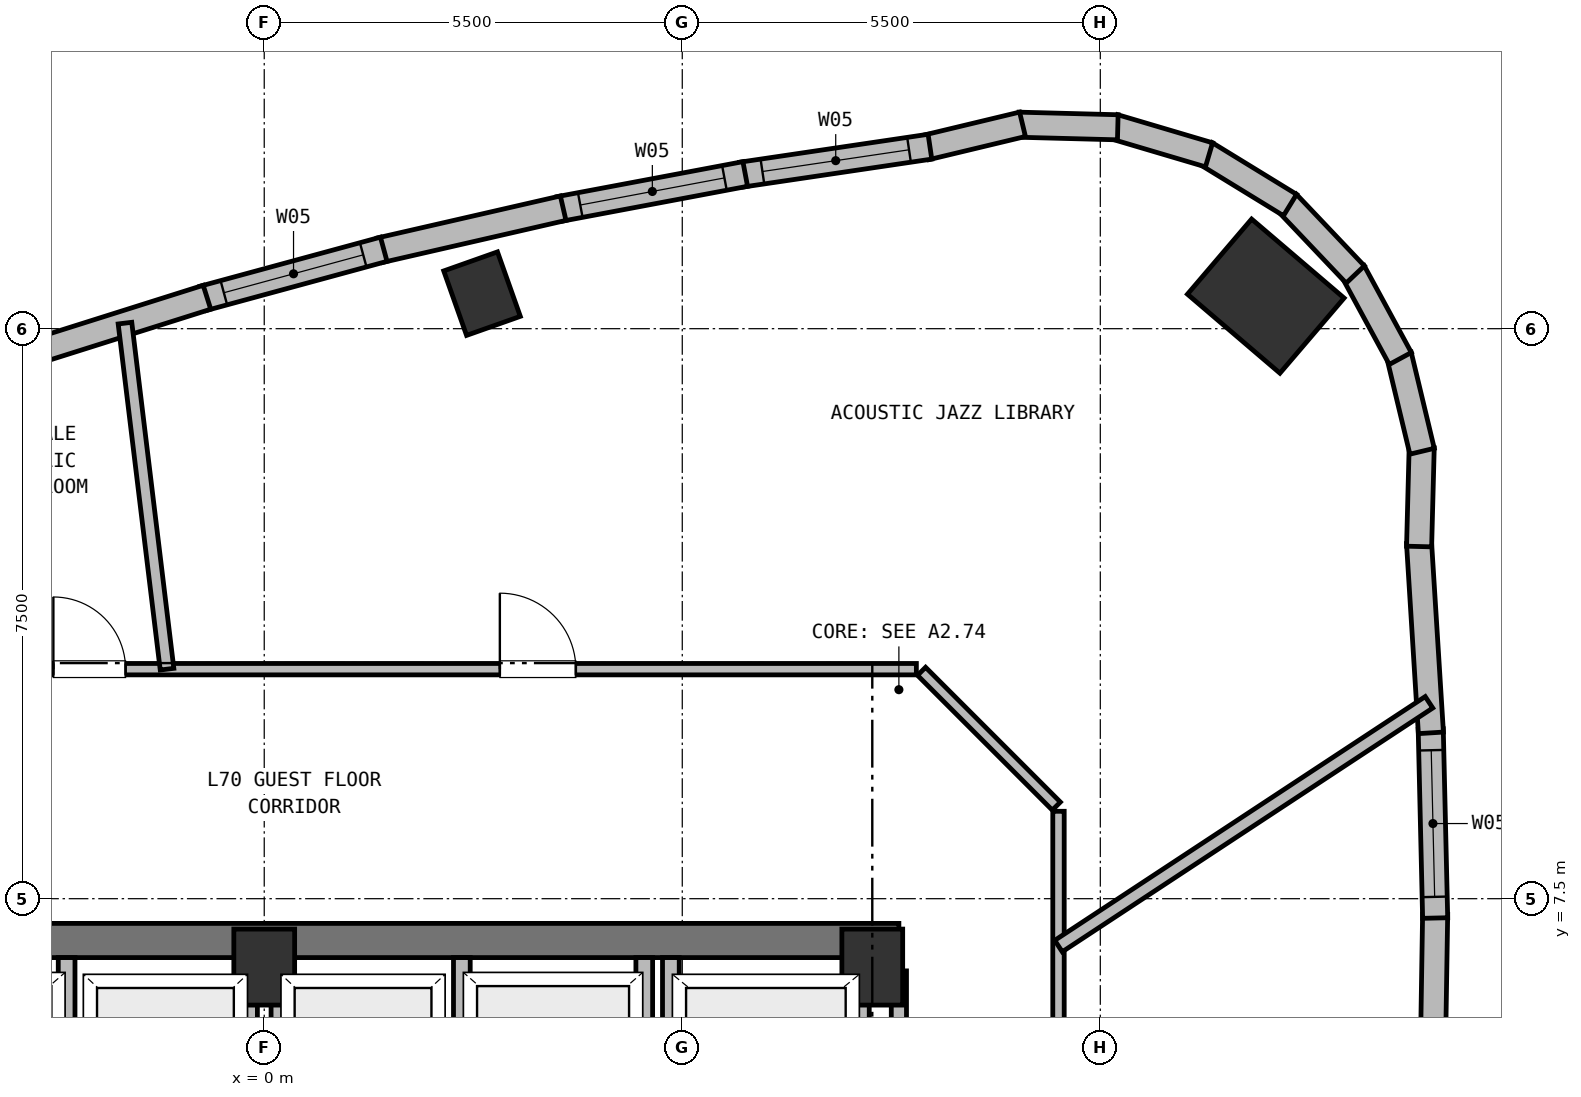
"""IFC4 building model, lengths in metres.
Left out: names, types, materials, properties, quantities, classifications, styles, units other than length and angle.
Written with IfcOpenShell. Run it as: python <this file> out.ifc"""

import sys

from ifc_helpers import new_model, si_unit, direction, frame, frame_2d, origin, origin_2d, place, context, subcontext, project, spatial, rectangle, extrude, element, fill, save


model = new_model("IFC4")
c1 = context("Model", 3, precision=1e-05, world=origin(), true_north=direction((0.0, 1.0)))
c2 = subcontext(c1, "Body", "Model", "MODEL_VIEW")
j1 = project(units=[si_unit("LENGTHUNIT", "METRE"), si_unit("PLANEANGLEUNIT", "RADIAN")], contexts=[c1])
p1 = place(None, origin())
s1 = spatial("IfcSite", under=j1, at=p1, CompositionType="ELEMENT")
p2 = place(p1, origin())
s2 = spatial("IfcBuilding", under=s1, at=p2, CompositionType="ELEMENT")
p3 = place(p2, frame((0.0, 0.0, 281.6)))
s3 = spatial("IfcBuildingStorey", under=s2, at=p3, CompositionType="ELEMENT", Elevation=281.6)
for number, where, z_axis, x_axis in (
    (1, (8.0, 6.6, 0.0), (0.0, 0.0, 1.0), (1.0, 0.0, 0.0)),
    (2, (0.0, 6.6, 0.0), (0.0, 0.0, 1.0), (1.0, 0.0, 0.0)),
):
    element("IfcColumn", number, at=place(p3, frame(where, z_axis=z_axis, x_axis=x_axis)), inside=s3, PredefinedType="COLUMN", context=c2, shape_type="SweptSolid", body=[
        extrude(rectangle(XDim=0.8, YDim=1.0, at=origin_2d()), origin(), (0.0, 0.0, 1.0), 4.4),
    ])
p4 = place(p3, frame((-8.35, 6.95, 0.0), z_axis=(0.0, 0.0, 1.0), x_axis=(1.0, 0.0, 0.0)))
e3 = element("IfcWall", 3, at=p4, inside=s3, PredefinedType="SHEAR", context=c2, shape_type="SweptSolid", body=[
    extrude(rectangle(XDim=16.7, YDim=0.45, at=frame_2d((8.35, 0.0))), origin(), (0.0, 0.0, 1.0), 4.13),
])
p5 = place(p3, frame((13.177, 15.428, 0.0), z_axis=(0.0, 0.0, 1.0), x_axis=(0.64944804833, 0.7604059656, 0.0)))
e4 = element("IfcColumn", 4, at=p5, inside=s3, PredefinedType="COLUMN", context=c2, shape_type="SweptSolid", body=[
    extrude(rectangle(XDim=1.3, YDim=1.6, at=origin_2d()), origin(), (0.0, 0.0, 1.0), 4.4),
])
p6 = place(p3, frame((2.865, 15.461, 0.0), z_axis=(0.0, 0.0, 1.0), x_axis=(0.942641491092, 0.333806859234, 0.0)))
e5 = element("IfcColumn", 5, at=p6, inside=s3, PredefinedType="COLUMN", context=c2, shape_type="SweptSolid", body=[
    extrude(rectangle(XDim=0.75, YDim=0.9, at=origin_2d()), origin(), (0.0, 0.0, 1.0), 4.4),
])
p7 = place(p3, frame((15.406, 7.295, 0.0), z_axis=(0.0, 0.0, 1.0), x_axis=(-0.016099859072, -0.999870388869, 0.0)))
e6 = element("IfcWall", 6, at=p7, inside=s3, PredefinedType="SOLIDWALL", context=c2, shape_type="SweptSolid", body=[
    extrude(rectangle(XDim=2.472, YDim=0.33, at=frame_2d((1.236, 0.0))), origin(), (0.0, 0.0, 1.0), 4.13),
])
p8 = place(p3, frame((15.347, 9.732, 0.0), z_axis=(0.0, 0.0, 1.0), x_axis=(0.023459423149, -0.999724789862, 0.0)))
e7 = element("IfcWall", 7, at=p8, inside=s3, PredefinedType="SOLIDWALL", context=c2, shape_type="SweptSolid", body=[
    extrude(rectangle(XDim=2.487, YDim=0.33, at=frame_2d((1.244, 0.0))), origin(), (0.0, 0.0, 1.0), 4.13),
])
p9 = place(p8, frame((0.279, 0.0, 0.72)))
e8 = element("IfcOpeningElement", 8, at=p9, cuts=e7, PredefinedType="OPENING", context=c2, shape_type="SweptSolid", body=[
    extrude(rectangle(XDim=1.93, YDim=2.15, at=frame_2d((0.965, 1.075))), frame((0.0, 0.175, 0.0), z_axis=(0.0, -1.0, 0.0), x_axis=(1.0, 0.0, 0.0)), (0.0, 0.0, 1.0), 0.35),
])
p10 = place(p3, frame((15.193, 12.184, 0.0), z_axis=(0.0, 0.0, 1.0), x_axis=(0.062329780416, -0.998055608908, 0.0)))
e9 = element("IfcWall", 9, at=p10, inside=s3, PredefinedType="SOLIDWALL", context=c2, shape_type="SweptSolid", body=[
    extrude(rectangle(XDim=2.507, YDim=0.33, at=frame_2d((1.253, 0.0))), origin(), (0.0, 0.0, 1.0), 4.13),
])
p11 = place(p3, frame((15.229, 13.437, 0.0), z_axis=(0.0, 0.0, 1.0), x_axis=(-0.026227855826, -0.999655990618, 0.0)))
e10 = element("IfcWall", 10, at=p11, inside=s3, PredefinedType="SOLIDWALL", context=c2, shape_type="SweptSolid", body=[
    extrude(rectangle(XDim=1.303, YDim=0.33, at=frame_2d((0.652, 0.0))), origin(), (0.0, 0.0, 1.0), 4.13),
])
p12 = place(p3, frame((14.929, 14.654, 0.0), z_axis=(0.0, 0.0, 1.0), x_axis=(0.233443812137, -0.972370292931, 0.0)))
e11 = element("IfcWall", 11, at=p12, inside=s3, PredefinedType="SOLIDWALL", context=c2, shape_type="SweptSolid", body=[
    extrude(rectangle(XDim=1.303, YDim=0.33, at=frame_2d((0.651, 0.0))), origin(), (0.0, 0.0, 1.0), 4.13),
])
for number, where, z_axis, x_axis in (
    (12, (14.325, 15.753, 0.0), (0.0, 0.0, 1.0), (0.477, -0.879, 0.0)),
    (13, (13.458, 16.658, 0.0), (0.0, 0.0, 1.0), (0.688, -0.725, 0.0)),
    (14, (12.385, 17.308, 0.0), (0.0, 0.0, 1.0), (0.853, -0.523, 0.0)),
    (15, (11.181, 17.658, 0.0), (0.0, 0.0, 1.0), (0.959, -0.284, 0.0)),
    (16, (9.927, 17.684, 0.0), (0.0, 0.0, 1.0), (1.0, -0.026, 0.0)),
):
    element("IfcWall", number, at=place(p3, frame(where, z_axis=z_axis, x_axis=x_axis)), inside=s3, PredefinedType="SOLIDWALL", context=c2, shape_type="SweptSolid", body=[
        extrude(rectangle(XDim=1.303, YDim=0.33, at=frame_2d((0.652, 0.0))), origin(), (0.0, 0.0, 1.0), 4.13),
    ])
p13 = place(p3, frame((8.71, 17.385, 0.0), z_axis=(0.0, 0.0, 1.0), x_axis=(0.972360080062, 0.233486347997, 0.0)))
e17 = element("IfcWall", 17, at=p13, inside=s3, PredefinedType="SOLIDWALL", context=c2, shape_type="SweptSolid", body=[
    extrude(rectangle(XDim=1.303, YDim=0.33, at=frame_2d((0.651, 0.0))), origin(), (0.0, 0.0, 1.0), 4.13),
])
p14 = place(p3, frame((6.279, 17.027, 0.0), z_axis=(0.0, 0.0, 1.0), x_axis=(0.989195615859, 0.146601615152, 0.0)))
e18 = element("IfcWall", 18, at=p14, inside=s3, PredefinedType="SOLIDWALL", context=c2, shape_type="SweptSolid", body=[
    extrude(rectangle(XDim=2.506, YDim=0.33, at=frame_2d((1.253, 0.0))), origin(), (0.0, 0.0, 1.0), 4.13),
])
p15 = place(p14, frame((0.278, 0.0, 0.72)))
e19 = element("IfcOpeningElement", 19, at=p15, cuts=e18, PredefinedType="OPENING", context=c2, shape_type="SweptSolid", body=[
    extrude(rectangle(XDim=1.95, YDim=2.15, at=frame_2d((0.975, 1.075))), frame((0.0, 0.175, 0.0), z_axis=(0.0, -1.0, 0.0), x_axis=(1.0, 0.0, 0.0)), (0.0, 0.0, 1.0), 0.35),
])
p16 = place(p3, frame((3.884, 16.575, 0.0), z_axis=(0.0, 0.0, 1.0), x_axis=(0.982755323562, 0.184910719024, 0.0)))
e20 = element("IfcWall", 20, at=p16, inside=s3, PredefinedType="SOLIDWALL", context=c2, shape_type="SweptSolid", body=[
    extrude(rectangle(XDim=2.488, YDim=0.33, at=frame_2d((1.244, 0.0))), origin(), (0.0, 0.0, 1.0), 4.13),
])
p17 = place(p16, frame((0.279, 0.0, 0.72)))
e21 = element("IfcOpeningElement", 21, at=p17, cuts=e20, PredefinedType="OPENING", context=c2, shape_type="SweptSolid", body=[
    extrude(rectangle(XDim=1.93, YDim=2.15, at=frame_2d((0.965, 1.075))), frame((0.0, 0.175, 0.0), z_axis=(0.0, -1.0, 0.0), x_axis=(1.0, 0.0, 0.0)), (0.0, 0.0, 1.0), 0.35),
])
p18 = place(p3, frame((1.524, 16.033, 0.0), z_axis=(0.0, 0.0, 1.0), x_axis=(0.974681670362, 0.223597051545, 0.0)))
e22 = element("IfcWall", 22, at=p18, inside=s3, PredefinedType="SOLIDWALL", context=c2, shape_type="SweptSolid", body=[
    extrude(rectangle(XDim=2.472, YDim=0.33, at=frame_2d((1.236, 0.0))), origin(), (0.0, 0.0, 1.0), 4.13),
])
p19 = place(p3, frame((-0.802, 15.399, 0.0), z_axis=(0.0, 0.0, 1.0), x_axis=(0.964933096461, 0.262495941596, 0.0)))
e23 = element("IfcWall", 23, at=p19, inside=s3, PredefinedType="SOLIDWALL", context=c2, shape_type="SweptSolid", body=[
    extrude(rectangle(XDim=2.46, YDim=0.33, at=frame_2d((1.23, 0.0))), origin(), (0.0, 0.0, 1.0), 4.13),
])
p20 = place(p19, frame((0.28, 0.0, 0.72)))
e24 = element("IfcOpeningElement", 24, at=p20, cuts=e23, PredefinedType="OPENING", context=c2, shape_type="SweptSolid", body=[
    extrude(rectangle(XDim=1.9, YDim=2.15, at=frame_2d((0.95, 1.075))), frame((0.0, 0.175, 0.0), z_axis=(0.0, -1.0, 0.0), x_axis=(1.0, 0.0, 0.0)), (0.0, 0.0, 1.0), 0.35),
])
p21 = place(p3, frame((-3.092, 14.676, 0.0), z_axis=(0.0, 0.0, 1.0), x_axis=(0.953629301066, 0.300983647643, 0.0)))
e25 = element("IfcWall", 25, at=p21, inside=s3, PredefinedType="SOLIDWALL", context=c2, shape_type="SweptSolid", body=[
    extrude(rectangle(XDim=2.452, YDim=0.33, at=frame_2d((1.226, 0.0))), origin(), (0.0, 0.0, 1.0), 4.13),
])
p22 = place(p3, frame((5.35, 4.57, 0.0), z_axis=(0.0, 0.0, 1.0), x_axis=(0.0, 1.0, 0.0)))
e26 = element("IfcWall", 26, at=p22, inside=s3, PredefinedType="PARTITIONING", context=c2, shape_type="SweptSolid", body=[
    extrude(rectangle(XDim=2.155, YDim=0.22, at=frame_2d((1.078, 0.0))), origin(), (0.0, 0.0, 1.0), 4.13),
])
p23 = place(p3, frame((7.85, 4.57, 0.0), z_axis=(0.0, 0.0, 1.0), x_axis=(0.0, 1.0, 0.0)))
e27 = element("IfcWall", 27, at=p23, inside=s3, PredefinedType="PARTITIONING", context=c2, shape_type="SweptSolid", body=[
    extrude(rectangle(XDim=2.155, YDim=0.22, at=frame_2d((1.078, 0.0))), origin(), (0.0, 0.0, 1.0), 3.81),
])
for number, where, z_axis, x_axis in (
    (28, (-2.6, 4.57, 0.0), (0.0, 0.0, 1.0), (0.0, 1.0, 0.0)),
    (29, (2.6, 4.57, 0.0), (0.0, 0.0, 1.0), (0.0, 1.0, 0.0)),
    (30, (5.0, 4.57, 0.0), (0.0, 0.0, 1.0), (0.0, 1.0, 0.0)),
    (31, (-0.2, 4.57, 0.0), (0.0, 0.0, 1.0), (0.0, 1.0, 0.0)),
    (32, (0.2, 4.57, 0.0), (0.0, 0.0, 1.0), (0.0, 1.0, 0.0)),
):
    element("IfcWall", number, at=place(p3, frame(where, z_axis=z_axis, x_axis=x_axis)), inside=s3, PredefinedType="PARTITIONING", context=c2, shape_type="SweptSolid", body=[
        extrude(rectangle(XDim=2.155, YDim=0.22, at=frame_2d((1.078, 0.0))), origin(), (0.0, 0.0, 1.0), 4.13),
    ])
p24 = place(p3, frame((8.35, 1.25, 0.0), z_axis=(0.0, 0.0, 1.0), x_axis=(0.0, 1.0, 0.0)))
e33 = element("IfcWall", 33, at=p24, inside=s3, PredefinedType="PARTITIONING", context=c2, shape_type="SweptSolid", body=[
    extrude(rectangle(XDim=5.3, YDim=0.2, at=frame_2d((2.65, 0.0))), origin(), (0.0, 0.0, 1.0), 4.13),
])
p25 = place(p24, frame((0.95, 0.0, 0.0)))
e34 = element("IfcOpeningElement", 34, at=p25, cuts=e33, PredefinedType="OPENING", context=c2, shape_type="SweptSolid", body=[
    extrude(rectangle(XDim=1.15, YDim=2.15, at=frame_2d((0.575, 1.075))), frame((0.0, 0.11, 0.0), z_axis=(0.0, -1.0, 0.0), x_axis=(1.0, 0.0, 0.0)), (0.0, 0.0, 1.0), 0.22),
])
p26 = place(p3, frame((10.45, 8.65, 0.0), z_axis=(0.0, 0.0, 1.0), x_axis=(0.0, -1.0, 0.0)))
e35 = element("IfcWall", 35, at=p26, inside=s3, PredefinedType="PARTITIONING", context=c2, shape_type="SweptSolid", body=[
    extrude(rectangle(XDim=15.89, YDim=0.15, at=frame_2d((7.945, 0.0))), origin(), (0.0, 0.0, 1.0), 3.83),
])
p27 = place(p26, frame((6.978, 0.0, 0.0)))
e36 = element("IfcOpeningElement", 36, at=p27, cuts=e35, PredefinedType="OPENING", context=c2, shape_type="SweptSolid", body=[
    extrude(rectangle(XDim=1.0, YDim=2.15, at=frame_2d((0.5, 1.075))), frame((0.0, 0.085, 0.0), z_axis=(0.0, -1.0, 0.0), x_axis=(1.0, 0.0, 0.0)), (0.0, 0.0, 1.0), 0.17),
])
p28 = place(p3, frame((8.648, 10.492, 0.0), z_axis=(0.0, 0.0, 1.0), x_axis=(0.707106781187, -0.707106781187, 0.0)))
e37 = element("IfcWall", 37, at=p28, inside=s3, PredefinedType="PARTITIONING", context=c2, shape_type="SweptSolid", body=[
    extrude(rectangle(XDim=2.508, YDim=0.15, at=frame_2d((1.254, 0.0))), origin(), (0.0, 0.0, 1.0), 4.13),
])
p29 = place(p3, frame((-11.51, 10.52, 0.0), z_axis=(0.0, 0.0, 1.0), x_axis=(1.0, 0.0, 0.0)))
e38 = element("IfcWall", 38, at=p29, inside=s3, PredefinedType="PARTITIONING", context=c2, shape_type="SweptSolid", body=[
    extrude(rectangle(XDim=20.09, YDim=0.15, at=frame_2d((10.045, 0.0))), origin(), (0.0, 0.0, 1.0), 4.13),
])
p30 = place(p29, frame((6.452, 0.0, 0.0)))
e39 = element("IfcOpeningElement", 39, at=p30, cuts=e38, PredefinedType="OPENING", context=c2, shape_type="SweptSolid", body=[
    extrude(rectangle(XDim=0.95, YDim=2.1, at=frame_2d((0.475, 1.05))), frame((0.0, 0.085, 0.0), z_axis=(0.0, -1.0, 0.0), x_axis=(1.0, 0.0, 0.0)), (0.0, 0.0, 1.0), 0.17),
])
p31 = place(p29, frame((8.736, 0.0, 0.0)))
e40 = element("IfcOpeningElement", 40, at=p31, cuts=e38, PredefinedType="OPENING", context=c2, shape_type="SweptSolid", body=[
    extrude(rectangle(XDim=0.95, YDim=2.1, at=frame_2d((0.475, 1.05))), frame((0.0, 0.085, 0.0), z_axis=(0.0, -1.0, 0.0), x_axis=(1.0, 0.0, 0.0)), (0.0, 0.0, 1.0), 0.17),
])
p32 = place(p29, frame((2.479, 0.0, 0.0)))
e41 = element("IfcOpeningElement", 41, at=p32, cuts=e38, PredefinedType="OPENING", context=c2, shape_type="SweptSolid", body=[
    extrude(rectangle(XDim=1.0, YDim=2.15, at=frame_2d((0.5, 1.075))), frame((0.0, 0.085, 0.0), z_axis=(0.0, -1.0, 0.0), x_axis=(1.0, 0.0, 0.0)), (0.0, 0.0, 1.0), 0.17),
])
p33 = place(p29, frame((14.61, 0.0, 0.0)))
e42 = element("IfcOpeningElement", 42, at=p33, cuts=e38, PredefinedType="OPENING", context=c2, shape_type="SweptSolid", body=[
    extrude(rectangle(XDim=1.0, YDim=2.15, at=frame_2d((0.5, 1.075))), frame((0.0, 0.085, 0.0), z_axis=(0.0, -1.0, 0.0), x_axis=(1.0, 0.0, 0.0)), (0.0, 0.0, 1.0), 0.17),
])
p34 = place(p3, frame((10.45, 6.876, 0.0), z_axis=(0.0, 0.0, 1.0), x_axis=(0.835369557095, 0.549688732902, 0.0)))
e43 = element("IfcWall", 43, at=p34, inside=s3, PredefinedType="PARTITIONING", context=c2, shape_type="SweptSolid", body=[
    extrude(rectangle(XDim=5.835, YDim=0.18, at=frame_2d((2.917, 0.0))), origin(), (0.0, 0.0, 1.0), 4.13),
])
p35 = place(p3, frame((-1.279, 10.52, 0.0), z_axis=(0.0, 0.0, 1.0), x_axis=(-0.120673142417, 0.992692295074, 0.0)))
e44 = element("IfcWall", 44, at=p35, inside=s3, PredefinedType="PARTITIONING", context=c2, shape_type="SweptSolid", body=[
    extrude(rectangle(XDim=4.586, YDim=0.18, at=frame_2d((2.293, 0.0))), origin(), (0.0, 0.0, 1.0), 4.13),
])
p36 = place(p9, origin())
e45 = element("IfcWindow", 45, at=p36, inside=s3, PartitioningType="SINGLE_PANEL", PredefinedType="WINDOW", context=c2, shape_type="SweptSolid", body=[
    extrude(rectangle(XDim=1.93, YDim=2.15, at=frame_2d((0.965, 1.075))), frame((0.0, 0.03, 0.0), z_axis=(0.0, -1.0, 0.0), x_axis=(1.0, 0.0, 0.0)), (0.0, 0.0, 1.0), 0.06),
])
fill(e8, e45)
p37 = place(p15, origin())
e46 = element("IfcWindow", 46, at=p37, inside=s3, PartitioningType="SINGLE_PANEL", PredefinedType="WINDOW", context=c2, shape_type="SweptSolid", body=[
    extrude(rectangle(XDim=1.95, YDim=2.15, at=frame_2d((0.975, 1.075))), frame((0.0, 0.03, 0.0), z_axis=(0.0, -1.0, 0.0), x_axis=(1.0, 0.0, 0.0)), (0.0, 0.0, 1.0), 0.06),
])
fill(e19, e46)
p38 = place(p17, origin())
e47 = element("IfcWindow", 47, at=p38, inside=s3, PartitioningType="SINGLE_PANEL", PredefinedType="WINDOW", context=c2, shape_type="SweptSolid", body=[
    extrude(rectangle(XDim=1.93, YDim=2.15, at=frame_2d((0.965, 1.075))), frame((0.0, 0.03, 0.0), z_axis=(0.0, -1.0, 0.0), x_axis=(1.0, 0.0, 0.0)), (0.0, 0.0, 1.0), 0.06),
])
fill(e21, e47)
p39 = place(p20, origin())
e48 = element("IfcWindow", 48, at=p39, inside=s3, PartitioningType="SINGLE_PANEL", PredefinedType="WINDOW", context=c2, shape_type="SweptSolid", body=[
    extrude(rectangle(XDim=1.9, YDim=2.15, at=frame_2d((0.95, 1.075))), frame((0.0, 0.03, 0.0), z_axis=(0.0, -1.0, 0.0), x_axis=(1.0, 0.0, 0.0)), (0.0, 0.0, 1.0), 0.06),
])
fill(e24, e48)
p40 = place(p31, origin())
e49 = element("IfcDoor", 49, at=p40, inside=s3, OperationType="SINGLE_SWING_LEFT", PredefinedType="DOOR", context=c2, shape_type="SweptSolid", body=[
    extrude(rectangle(XDim=0.95, YDim=2.1, at=frame_2d((0.475, 1.05))), frame((0.0, 0.025, 0.0), z_axis=(0.0, -1.0, 0.0), x_axis=(1.0, 0.0, 0.0)), (0.0, 0.0, 1.0), 0.05),
])
fill(e40, e49)
p41 = place(p33, origin())
e50 = element("IfcDoor", 50, at=p41, inside=s3, OperationType="SINGLE_SWING_LEFT", PredefinedType="DOOR", context=c2, shape_type="SweptSolid", body=[
    extrude(rectangle(XDim=1.0, YDim=2.15, at=frame_2d((0.5, 1.075))), frame((0.0, 0.025, 0.0), z_axis=(0.0, -1.0, 0.0), x_axis=(1.0, 0.0, 0.0)), (0.0, 0.0, 1.0), 0.05),
])
fill(e42, e50)
save(model, sys.argv[1])
